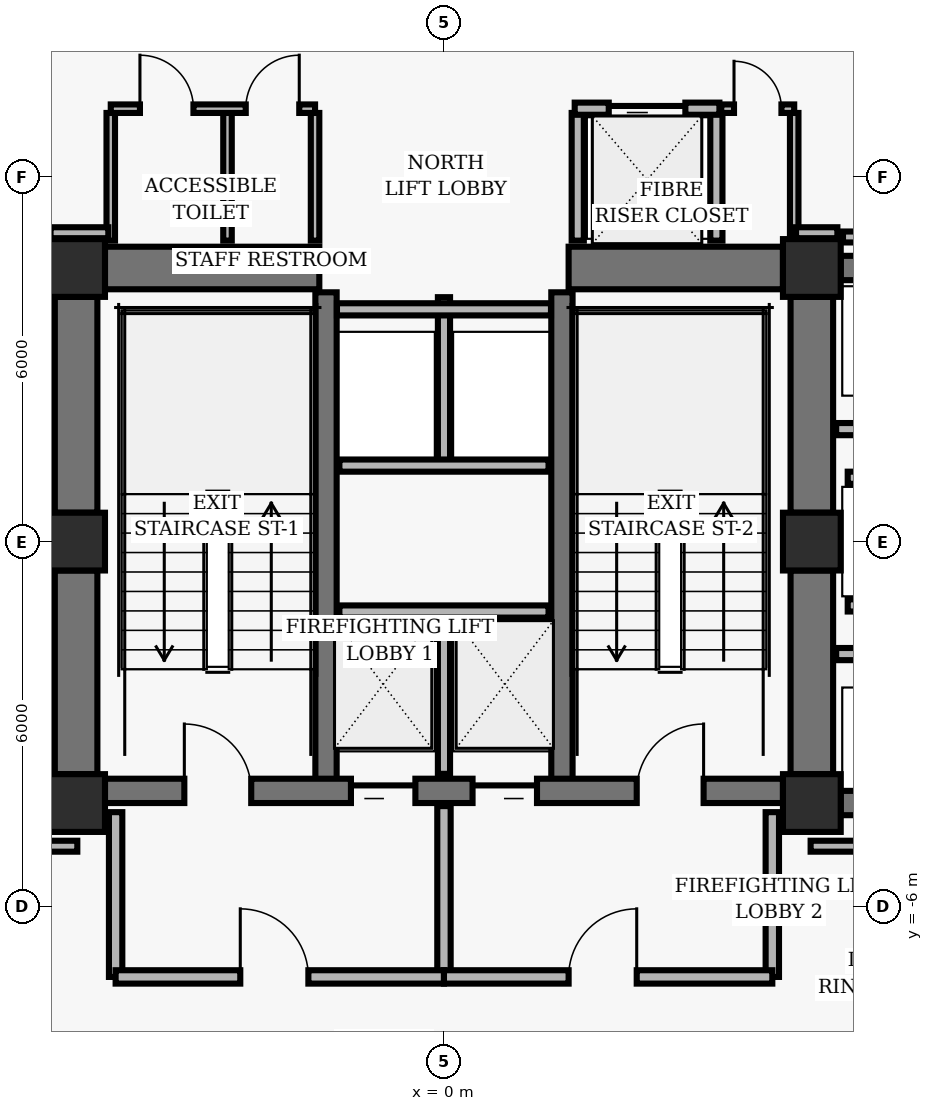
"""IFC4 building model, lengths in metres.
Left out: names, types, materials, properties, quantities, classifications, styles, units other than length and angle.
Written with IfcOpenShell. Run it as: python <this file> out.ifc"""

import sys

from ifc_helpers import new_model, si_unit, direction, frame, frame_2d, origin, origin_2d, place, context, subcontext, project, spatial, rectangle, hollow_rectangle, extrude, element, fill, save


model = new_model("IFC4")
c1 = context("Model", 3, precision=1e-05, world=origin(), true_north=direction((0.0, 1.0)))
c2 = subcontext(c1, "Body", "Model", "MODEL_VIEW")
j1 = project(units=[si_unit("LENGTHUNIT", "METRE"), si_unit("PLANEANGLEUNIT", "RADIAN")], contexts=[c1])
p1 = place(None, origin())
s1 = spatial("IfcSite", under=j1, at=p1, CompositionType="ELEMENT")
p2 = place(p1, origin())
s2 = spatial("IfcBuilding", under=s1, at=p2, CompositionType="ELEMENT")
p3 = place(p2, frame((0.0, 0.0, 39.04)))
s3 = spatial("IfcBuildingStorey", under=s2, at=p3, CompositionType="ELEMENT", Elevation=39.04)
for number, where, z_axis, x_axis in (
    (1, (-6.05, 4.5, 0.0), (0.0, 0.0, 1.0), (1.0, 0.0, 0.0)),
    (2, (6.05, 4.5, 0.0), (0.0, 0.0, 1.0), (1.0, 0.0, 0.0)),
    (3, (-6.05, 0.0, 0.0), (0.0, 0.0, 1.0), (1.0, 0.0, 0.0)),
    (4, (6.05, 0.0, 0.0), (0.0, 0.0, 1.0), (1.0, 0.0, 0.0)),
    (5, (-6.05, -4.3, 0.0), (0.0, 0.0, 1.0), (1.0, 0.0, 0.0)),
    (6, (6.05, -4.3, 0.0), (0.0, 0.0, 1.0), (1.0, 0.0, 0.0)),
):
    element("IfcColumn", number, at=place(p3, frame(where, z_axis=z_axis, x_axis=x_axis)), inside=s3, PredefinedType="COLUMN", context=c2, shape_type="SweptSolid", body=[
        extrude(hollow_rectangle(XDim=0.95, YDim=0.95, WallThickness=0.06, InnerFilletRadius=0.02, OuterFilletRadius=0.04, at=origin_2d()), origin(), (0.0, 0.0, 1.0), 3.36),
    ])
p4 = place(p3, frame((-6.05, 0.475, 0.0), z_axis=(0.0, 0.0, 1.0), x_axis=(0.0, 1.0, 0.0)))
e7 = element("IfcWall", 7, at=p4, inside=s3, PredefinedType="SHEAR", context=c2, shape_type="SweptSolid", body=[
    extrude(rectangle(XDim=3.55, YDim=0.7, at=frame_2d((1.775, 0.0))), origin(), (0.0, 0.0, 1.0), 3.098),
])
p5 = place(p3, frame((-6.05, -3.825, 0.0), z_axis=(0.0, 0.0, 1.0), x_axis=(0.0, 1.0, 0.0)))
e8 = element("IfcWall", 8, at=p5, inside=s3, PredefinedType="SHEAR", context=c2, shape_type="SweptSolid", body=[
    extrude(rectangle(XDim=3.35, YDim=0.7, at=frame_2d((1.675, 0.0))), origin(), (0.0, 0.0, 1.0), 3.098),
])
p6 = place(p3, frame((6.05, 0.475, 0.0), z_axis=(0.0, 0.0, 1.0), x_axis=(0.0, 1.0, 0.0)))
e9 = element("IfcWall", 9, at=p6, inside=s3, PredefinedType="SHEAR", context=c2, shape_type="SweptSolid", body=[
    extrude(rectangle(XDim=3.55, YDim=0.7, at=frame_2d((1.775, 0.0))), origin(), (0.0, 0.0, 1.0), 3.098),
])
p7 = place(p3, frame((6.05, -3.825, 0.0), z_axis=(0.0, 0.0, 1.0), x_axis=(0.0, 1.0, 0.0)))
e10 = element("IfcWall", 10, at=p7, inside=s3, PredefinedType="SHEAR", context=c2, shape_type="SweptSolid", body=[
    extrude(rectangle(XDim=3.35, YDim=0.7, at=frame_2d((1.675, 0.0))), origin(), (0.0, 0.0, 1.0), 3.098),
])
for number, where, z_axis, x_axis in (
    (11, (-1.94, -4.1, 0.0), (0.0, 0.0, 1.0), (0.0, 1.0, 0.0)),
    (12, (1.94, -4.1, 0.0), (0.0, 0.0, 1.0), (0.0, 1.0, 0.0)),
):
    element("IfcWall", number, at=place(p3, frame(where, z_axis=z_axis, x_axis=x_axis)), inside=s3, PredefinedType="SHEAR", context=c2, shape_type="SweptSolid", body=[
        extrude(rectangle(XDim=8.2, YDim=0.35, at=frame_2d((4.1, 0.0))), origin(), (0.0, 0.0, 1.0), 3.098),
    ])
p8 = place(p3, frame((-5.575, -4.1, 0.0), z_axis=(0.0, 0.0, 1.0), x_axis=(1.0, 0.0, 0.0)))
e13 = element("IfcWall", 13, at=p8, inside=s3, PredefinedType="SHEAR", context=c2, shape_type="SweptSolid", body=[
    extrude(rectangle(XDim=11.15, YDim=0.4, at=frame_2d((5.575, 0.0))), origin(), (0.0, 0.0, 1.0), 3.098),
])
p9 = place(p8, frame((1.305, 0.0, 0.0)))
e14 = element("IfcOpeningElement", 14, at=p9, cuts=e13, PredefinedType="OPENING", context=c2, shape_type="SweptSolid", body=[
    extrude(rectangle(XDim=1.1, YDim=2.04, at=frame_2d((0.55, 1.02))), frame((0.0, 0.21, 0.0), z_axis=(0.0, -1.0, 0.0), x_axis=(1.0, 0.0, 0.0)), (0.0, 0.0, 1.0), 0.42),
])
p10 = place(p8, frame((8.745, 0.0, 0.0)))
e15 = element("IfcOpeningElement", 15, at=p10, cuts=e13, PredefinedType="OPENING", context=c2, shape_type="SweptSolid", body=[
    extrude(rectangle(XDim=1.1, YDim=2.04, at=frame_2d((0.55, 1.02))), frame((0.0, 0.21, 0.0), z_axis=(0.0, -1.0, 0.0), x_axis=(1.0, 0.0, 0.0)), (0.0, 0.0, 1.0), 0.42),
])
p11 = place(p8, frame((4.045, 0.0, 0.0)))
e16 = element("IfcOpeningElement", 16, at=p11, cuts=e13, PredefinedType="OPENING", context=c2, shape_type="SweptSolid", body=[
    extrude(rectangle(XDim=1.06, YDim=2.04, at=frame_2d((0.53, 1.02))), frame((0.0, 0.21, 0.0), z_axis=(0.0, -1.0, 0.0), x_axis=(1.0, 0.0, 0.0)), (0.0, 0.0, 1.0), 0.42),
])
p12 = place(p8, frame((6.045, 0.0, 0.0)))
e17 = element("IfcOpeningElement", 17, at=p12, cuts=e13, PredefinedType="OPENING", context=c2, shape_type="SweptSolid", body=[
    extrude(rectangle(XDim=1.06, YDim=2.04, at=frame_2d((0.53, 1.02))), frame((0.0, 0.21, 0.0), z_axis=(0.0, -1.0, 0.0), x_axis=(1.0, 0.0, 0.0)), (0.0, 0.0, 1.0), 0.42),
])
for number, where, z_axis, x_axis in (
    (18, (-5.575, 4.5, 0.0), (0.0, 0.0, 1.0), (1.0, 0.0, 0.0)),
    (19, (2.05, 4.5, 0.0), (0.0, 0.0, 1.0), (1.0, 0.0, 0.0)),
):
    element("IfcWall", number, at=place(p3, frame(where, z_axis=z_axis, x_axis=x_axis)), inside=s3, PredefinedType="SHEAR", context=c2, shape_type="SweptSolid", body=[
        extrude(rectangle(XDim=3.525, YDim=0.7, at=frame_2d((1.762, 0.0))), origin(), (0.0, 0.0, 1.0), 3.098),
    ])
for number, where, z_axis, x_axis in (
    (20, (6.525, 4.5, 0.0), (0.0, 0.0, 1.0), (1.0, 0.0, 0.0)),
    (21, (6.525, -4.3, 0.0), (0.0, 0.0, 1.0), (1.0, 0.0, 0.0)),
):
    element("IfcWall", number, at=place(p3, frame(where, z_axis=z_axis, x_axis=x_axis)), inside=s3, PredefinedType="SHEAR", context=c2, shape_type="SweptSolid", body=[
        extrude(rectangle(XDim=1.95, YDim=0.4, at=frame_2d((0.975, 0.0))), origin(), (0.0, 0.0, 1.0), 3.098),
    ])
p13 = place(p3, frame((0.0, -3.82, 0.0), z_axis=(0.0, 0.0, 1.0), x_axis=(0.0, 1.0, 0.0)))
e22 = element("IfcWall", 22, at=p13, inside=s3, PredefinedType="PARTITIONING", context=c2, shape_type="SweptSolid", body=[
    extrude(rectangle(XDim=2.67, YDim=0.2, at=frame_2d((1.335, 0.0))), origin(), (0.0, 0.0, 1.0), 3.073),
])
p14 = place(p3, frame((-1.72, -1.15, 0.0), z_axis=(0.0, 0.0, 1.0), x_axis=(1.0, 0.0, 0.0)))
e23 = element("IfcWall", 23, at=p14, inside=s3, PredefinedType="PARTITIONING", context=c2, shape_type="SweptSolid", body=[
    extrude(rectangle(XDim=3.44, YDim=0.2, at=frame_2d((1.72, 0.0))), origin(), (0.0, 0.0, 1.0), 3.073),
])
for number, where, z_axis, x_axis in (
    (24, (-5.4, -7.16, 0.0), (0.0, 0.0, 1.0), (0.0, 1.0, 0.0)),
    (25, (5.4, -7.16, 0.0), (0.0, 0.0, 1.0), (0.0, 1.0, 0.0)),
):
    element("IfcWall", number, at=place(p3, frame(where, z_axis=z_axis, x_axis=x_axis)), inside=s3, PredefinedType="PARTITIONING", context=c2, shape_type="SweptSolid", body=[
        extrude(rectangle(XDim=2.71, YDim=0.22, at=frame_2d((1.355, 0.0))), origin(), (0.0, 0.0, 1.0), 3.073),
    ])
p15 = place(p3, frame((0.0, -7.16, 0.0), z_axis=(0.0, 0.0, 1.0), x_axis=(0.0, 1.0, 0.0)))
e26 = element("IfcWall", 26, at=p15, inside=s3, PredefinedType="PARTITIONING", context=c2, shape_type="SweptSolid", body=[
    extrude(rectangle(XDim=2.81, YDim=0.22, at=frame_2d((1.405, 0.0))), origin(), (0.0, 0.0, 1.0), 3.073),
])
p16 = place(p3, frame((-5.4, -7.16, 0.0), z_axis=(0.0, 0.0, 1.0), x_axis=(1.0, 0.0, 0.0)))
e27 = element("IfcWall", 27, at=p16, inside=s3, PredefinedType="PARTITIONING", context=c2, shape_type="SweptSolid", body=[
    extrude(rectangle(XDim=5.4, YDim=0.22, at=frame_2d((2.7, 0.0))), origin(), (0.0, 0.0, 1.0), 3.073),
])
p17 = place(p16, frame((2.05, 0.0, 0.0)))
e28 = element("IfcOpeningElement", 28, at=p17, cuts=e27, PredefinedType="OPENING", context=c2, shape_type="SweptSolid", body=[
    extrude(rectangle(XDim=1.12, YDim=2.02, at=frame_2d((0.56, 1.01))), frame((0.0, 0.12, 0.0), z_axis=(0.0, -1.0, 0.0), x_axis=(1.0, 0.0, 0.0)), (0.0, 0.0, 1.0), 0.24),
])
p18 = place(p3, frame((0.0, -7.16, 0.0), z_axis=(0.0, 0.0, 1.0), x_axis=(1.0, 0.0, 0.0)))
e29 = element("IfcWall", 29, at=p18, inside=s3, PredefinedType="PARTITIONING", context=c2, shape_type="SweptSolid", body=[
    extrude(rectangle(XDim=5.4, YDim=0.22, at=frame_2d((2.7, 0.0))), origin(), (0.0, 0.0, 1.0), 3.073),
])
p19 = place(p18, frame((2.05, 0.0, 0.0)))
e30 = element("IfcOpeningElement", 30, at=p19, cuts=e29, PredefinedType="OPENING", context=c2, shape_type="SweptSolid", body=[
    extrude(rectangle(XDim=1.12, YDim=2.02, at=frame_2d((0.56, 1.01))), frame((0.0, 0.12, 0.0), z_axis=(0.0, -1.0, 0.0), x_axis=(1.0, 0.0, 0.0)), (0.0, 0.0, 1.0), 0.24),
])
p20 = place(p3, frame((0.0, 1.25, 0.0), z_axis=(0.0, 0.0, 1.0), x_axis=(0.0, 1.0, 0.0)))
e31 = element("IfcWall", 31, at=p20, inside=s3, PredefinedType="PARTITIONING", context=c2, shape_type="SweptSolid", body=[
    extrude(rectangle(XDim=2.77, YDim=0.2, at=frame_2d((1.385, 0.0))), origin(), (0.0, 0.0, 1.0), 3.073),
])
p21 = place(p3, frame((-1.72, 1.25, 0.0), z_axis=(0.0, 0.0, 1.0), x_axis=(1.0, 0.0, 0.0)))
e32 = element("IfcWall", 32, at=p21, inside=s3, PredefinedType="PARTITIONING", context=c2, shape_type="SweptSolid", body=[
    extrude(rectangle(XDim=3.44, YDim=0.2, at=frame_2d((1.72, 0.0))), origin(), (0.0, 0.0, 1.0), 3.073),
])
p22 = place(p3, frame((-1.76, 3.82, 0.0), z_axis=(0.0, 0.0, 1.0), x_axis=(1.0, 0.0, 0.0)))
e33 = element("IfcWall", 33, at=p22, inside=s3, PredefinedType="PARTITIONING", context=c2, shape_type="SweptSolid", body=[
    extrude(rectangle(XDim=3.52, YDim=0.2, at=frame_2d((1.76, 0.0))), origin(), (0.0, 0.0, 1.0), 3.073),
])
for number, where, z_axis, x_axis in (
    (34, (2.2, 4.95, 0.0), (0.0, 0.0, 1.0), (0.0, 1.0, 0.0)),
    (35, (4.48, 4.95, 0.0), (0.0, 0.0, 1.0), (0.0, 1.0, 0.0)),
):
    element("IfcWall", number, at=place(p3, frame(where, z_axis=z_axis, x_axis=x_axis)), inside=s3, PredefinedType="PARTITIONING", context=c2, shape_type="SweptSolid", body=[
        extrude(rectangle(XDim=2.1, YDim=0.2, at=frame_2d((1.05, 0.0))), origin(), (0.0, 0.0, 1.0), 3.073),
    ])
p23 = place(p3, frame((2.15, 7.12, 0.0), z_axis=(0.0, 0.0, 1.0), x_axis=(1.0, 0.0, 0.0)))
e36 = element("IfcWall", 36, at=p23, inside=s3, PredefinedType="PARTITIONING", context=c2, shape_type="SweptSolid", body=[
    extrude(rectangle(XDim=2.38, YDim=0.2, at=frame_2d((1.19, 0.0))), origin(), (0.0, 0.0, 1.0), 3.073),
])
p24 = place(p23, frame((0.56, 0.0, 0.0)))
e37 = element("IfcOpeningElement", 37, at=p24, cuts=e36, PredefinedType="OPENING", context=c2, shape_type="SweptSolid", body=[
    extrude(rectangle(XDim=1.26, YDim=2.06, at=frame_2d((0.63, 1.03))), frame((0.0, 0.11, 0.0), z_axis=(0.0, -1.0, 0.0), x_axis=(1.0, 0.0, 0.0)), (0.0, 0.0, 1.0), 0.22),
])
for number, where, z_axis, x_axis in (
    (38, (-5.48, 4.95, 0.0), (0.0, 0.0, 1.0), (0.0, 1.0, 0.0)),
    (39, (-3.56, 4.95, 0.0), (0.0, 0.0, 1.0), (0.0, 1.0, 0.0)),
    (40, (-2.12, 4.95, 0.0), (0.0, 0.0, 1.0), (0.0, 1.0, 0.0)),
):
    element("IfcWall", number, at=place(p3, frame(where, z_axis=z_axis, x_axis=x_axis)), inside=s3, PredefinedType="PARTITIONING", context=c2, shape_type="SweptSolid", body=[
        extrude(rectangle(XDim=2.1, YDim=0.14, at=frame_2d((1.05, 0.0))), origin(), (0.0, 0.0, 1.0), 3.073),
    ])
p25 = place(p3, frame((-5.48, 7.12, 0.0), z_axis=(0.0, 0.0, 1.0), x_axis=(1.0, 0.0, 0.0)))
e41 = element("IfcWall", 41, at=p25, inside=s3, PredefinedType="PARTITIONING", context=c2, shape_type="SweptSolid", body=[
    extrude(rectangle(XDim=3.36, YDim=0.14, at=frame_2d((1.68, 0.0))), origin(), (0.0, 0.0, 1.0), 3.073),
])
p26 = place(p25, frame((0.48, 0.0, 0.0)))
e42 = element("IfcOpeningElement", 42, at=p26, cuts=e41, PredefinedType="OPENING", context=c2, shape_type="SweptSolid", body=[
    extrude(rectangle(XDim=0.88, YDim=2.02, at=frame_2d((0.44, 1.01))), frame((0.0, 0.08, 0.0), z_axis=(0.0, -1.0, 0.0), x_axis=(1.0, 0.0, 0.0)), (0.0, 0.0, 1.0), 0.16),
])
p27 = place(p25, frame((2.22, 0.0, 0.0)))
e43 = element("IfcOpeningElement", 43, at=p27, cuts=e41, PredefinedType="OPENING", context=c2, shape_type="SweptSolid", body=[
    extrude(rectangle(XDim=0.88, YDim=2.02, at=frame_2d((0.44, 1.01))), frame((0.0, 0.08, 0.0), z_axis=(0.0, -1.0, 0.0), x_axis=(1.0, 0.0, 0.0)), (0.0, 0.0, 1.0), 0.16),
])
p28 = place(p3, frame((5.76, 4.95, 0.0), z_axis=(0.0, 0.0, 1.0), x_axis=(0.0, 1.0, 0.0)))
e44 = element("IfcWall", 44, at=p28, inside=s3, PredefinedType="PARTITIONING", context=c2, shape_type="SweptSolid", body=[
    extrude(rectangle(XDim=2.1, YDim=0.14, at=frame_2d((1.05, 0.0))), origin(), (0.0, 0.0, 1.0), 3.073),
])
p29 = place(p3, frame((4.56, 7.12, 0.0), z_axis=(0.0, 0.0, 1.0), x_axis=(1.0, 0.0, 0.0)))
e45 = element("IfcWall", 45, at=p29, inside=s3, PredefinedType="PARTITIONING", context=c2, shape_type="SweptSolid", body=[
    extrude(rectangle(XDim=1.2, YDim=0.14, at=frame_2d((0.6, 0.0))), origin(), (0.0, 0.0, 1.0), 3.073),
])
p30 = place(p29, frame((0.21, 0.0, 0.0)))
e46 = element("IfcOpeningElement", 46, at=p30, cuts=e45, PredefinedType="OPENING", context=c2, shape_type="SweptSolid", body=[
    extrude(rectangle(XDim=0.78, YDim=2.01, at=frame_2d((0.39, 1.005))), frame((0.0, 0.08, 0.0), z_axis=(0.0, -1.0, 0.0), x_axis=(1.0, 0.0, 0.0)), (0.0, 0.0, 1.0), 0.16),
])
for number, where, z_axis, x_axis in (
    (47, (6.45, -1.85, 0.0), (0.0, 0.0, 1.0), (1.0, 0.0, 0.0)),
    (48, (6.45, 1.85, 0.0), (0.0, 0.0, 1.0), (1.0, 0.0, 0.0)),
):
    element("IfcWall", number, at=place(p3, frame(where, z_axis=z_axis, x_axis=x_axis)), inside=s3, PredefinedType="PARTITIONING", context=c2, shape_type="SweptSolid", body=[
        extrude(rectangle(XDim=2.1, YDim=0.2, at=frame_2d((1.05, 0.0))), origin(), (0.0, 0.0, 1.0), 3.073),
    ])
for number, where, z_axis, x_axis in (
    (49, (6.64, -1.05, 0.0), (0.0, 0.0, 1.0), (1.0, 0.0, 0.0)),
    (50, (6.64, 1.05, 0.0), (0.0, 0.0, 1.0), (1.0, 0.0, 0.0)),
):
    element("IfcWall", number, at=place(p3, frame(where, z_axis=z_axis, x_axis=x_axis)), inside=s3, PredefinedType="PARTITIONING", context=c2, shape_type="SweptSolid", body=[
        extrude(rectangle(XDim=1.91, YDim=0.2, at=frame_2d((0.955, 0.0))), origin(), (0.0, 0.0, 1.0), 3.073),
    ])
for number, where, z_axis, x_axis in (
    (51, (-9.37, -5.01, 0.0), (0.0, 0.0, 1.0), (1.0, 0.0, 0.0)),
    (52, (6.03, -5.01, 0.0), (0.0, 0.0, 1.0), (1.0, 0.0, 0.0)),
):
    element("IfcWall", number, at=place(p3, frame(where, z_axis=z_axis, x_axis=x_axis)), inside=s3, PredefinedType="PARTITIONING", context=c2, shape_type="SweptSolid", body=[
        extrude(rectangle(XDim=3.34, YDim=0.18, at=frame_2d((1.67, 0.0))), origin(), (0.0, 0.0, 1.0), 3.073),
    ])
p31 = place(p3, frame((9.37, 5.01, 0.0), z_axis=(0.0, 0.0, 1.0), x_axis=(-1.0, 0.0, 0.0)))
e53 = element("IfcWall", 53, at=p31, inside=s3, PredefinedType="PARTITIONING", context=c2, shape_type="SweptSolid", body=[
    extrude(rectangle(XDim=2.808, YDim=0.18, at=frame_2d((1.404, 0.0))), origin(), (0.0, 0.0, 1.0), 3.073),
])
p32 = place(p3, frame((6.47, 5.08, 0.0), z_axis=(0.0, 0.0, 1.0), x_axis=(-1.0, 0.0, 0.0)))
e54 = element("IfcWall", 54, at=p32, inside=s3, PredefinedType="PARTITIONING", context=c2, shape_type="SweptSolid", body=[
    extrude(rectangle(XDim=0.68, YDim=0.18, at=frame_2d((0.34, 0.0))), origin(), (0.0, 0.0, 1.0), 3.073),
])
p33 = place(p3, frame((-5.52, 5.08, 0.0), z_axis=(0.0, 0.0, 1.0), x_axis=(-1.0, 0.0, 0.0)))
e55 = element("IfcWall", 55, at=p33, inside=s3, PredefinedType="PARTITIONING", context=c2, shape_type="SweptSolid", body=[
    extrude(rectangle(XDim=0.95, YDim=0.18, at=frame_2d((0.475, 0.0))), origin(), (0.0, 0.0, 1.0), 3.073),
])
p34 = place(p9, origin())
e56 = element("IfcDoor", 56, at=p34, inside=s3, OperationType="SINGLE_SWING_LEFT", PredefinedType="DOOR", context=c2, shape_type="SweptSolid", body=[
    extrude(rectangle(XDim=1.1, YDim=2.04, at=frame_2d((0.55, 1.02))), frame((0.0, 0.025, 0.0), z_axis=(0.0, -1.0, 0.0), x_axis=(1.0, 0.0, 0.0)), (0.0, 0.0, 1.0), 0.05),
])
fill(e14, e56)
p35 = place(p10, origin())
e57 = element("IfcDoor", 57, at=p35, inside=s3, OperationType="SINGLE_SWING_RIGHT", PredefinedType="DOOR", context=c2, shape_type="SweptSolid", body=[
    extrude(rectangle(XDim=1.1, YDim=2.04, at=frame_2d((0.55, 1.02))), frame((0.0, 0.025, 0.0), z_axis=(0.0, -1.0, 0.0), x_axis=(1.0, 0.0, 0.0)), (0.0, 0.0, 1.0), 0.05),
])
fill(e15, e57)
p36 = place(p11, origin())
e58 = element("IfcDoor", 58, at=p36, inside=s3, OperationType="SLIDING_TO_LEFT", PredefinedType="DOOR", context=c2, shape_type="SweptSolid", body=[
    extrude(rectangle(XDim=1.06, YDim=2.04, at=frame_2d((0.53, 1.02))), frame((0.0, 0.025, 0.0), z_axis=(0.0, -1.0, 0.0), x_axis=(1.0, 0.0, 0.0)), (0.0, 0.0, 1.0), 0.05),
])
fill(e16, e58)
p37 = place(p12, origin())
e59 = element("IfcDoor", 59, at=p37, inside=s3, OperationType="SLIDING_TO_RIGHT", PredefinedType="DOOR", context=c2, shape_type="SweptSolid", body=[
    extrude(rectangle(XDim=1.06, YDim=2.04, at=frame_2d((0.53, 1.02))), frame((0.0, 0.025, 0.0), z_axis=(0.0, -1.0, 0.0), x_axis=(1.0, 0.0, 0.0)), (0.0, 0.0, 1.0), 0.05),
])
fill(e17, e59)
p38 = place(p17, origin())
e60 = element("IfcDoor", 60, at=p38, inside=s3, OperationType="SINGLE_SWING_LEFT", PredefinedType="DOOR", context=c2, shape_type="SweptSolid", body=[
    extrude(rectangle(XDim=1.12, YDim=2.02, at=frame_2d((0.56, 1.01))), frame((0.0, 0.025, 0.0), z_axis=(0.0, -1.0, 0.0), x_axis=(1.0, 0.0, 0.0)), (0.0, 0.0, 1.0), 0.05),
])
fill(e28, e60)
p39 = place(p19, origin())
e61 = element("IfcDoor", 61, at=p39, inside=s3, OperationType="SINGLE_SWING_RIGHT", PredefinedType="DOOR", context=c2, shape_type="SweptSolid", body=[
    extrude(rectangle(XDim=1.12, YDim=2.02, at=frame_2d((0.56, 1.01))), frame((0.0, 0.025, 0.0), z_axis=(0.0, -1.0, 0.0), x_axis=(1.0, 0.0, 0.0)), (0.0, 0.0, 1.0), 0.05),
])
fill(e30, e61)
p40 = place(p24, origin())
e62 = element("IfcDoor", 62, at=p40, inside=s3, OperationType="SLIDING_TO_LEFT", PredefinedType="DOOR", context=c2, shape_type="SweptSolid", body=[
    extrude(rectangle(XDim=1.26, YDim=2.06, at=frame_2d((0.63, 1.03))), frame((0.0, 0.025, 0.0), z_axis=(0.0, -1.0, 0.0), x_axis=(1.0, 0.0, 0.0)), (0.0, 0.0, 1.0), 0.05),
])
fill(e37, e62)
p41 = place(p26, origin())
e63 = element("IfcDoor", 63, at=p41, inside=s3, OperationType="SINGLE_SWING_LEFT", PredefinedType="DOOR", context=c2, shape_type="SweptSolid", body=[
    extrude(rectangle(XDim=0.88, YDim=2.02, at=frame_2d((0.44, 1.01))), frame((0.0, 0.025, 0.0), z_axis=(0.0, -1.0, 0.0), x_axis=(1.0, 0.0, 0.0)), (0.0, 0.0, 1.0), 0.05),
])
fill(e42, e63)
p42 = place(p27, origin())
e64 = element("IfcDoor", 64, at=p42, inside=s3, OperationType="SINGLE_SWING_RIGHT", PredefinedType="DOOR", context=c2, shape_type="SweptSolid", body=[
    extrude(rectangle(XDim=0.88, YDim=2.02, at=frame_2d((0.44, 1.01))), frame((0.0, 0.025, 0.0), z_axis=(0.0, -1.0, 0.0), x_axis=(1.0, 0.0, 0.0)), (0.0, 0.0, 1.0), 0.05),
])
fill(e43, e64)
p43 = place(p30, origin())
e65 = element("IfcDoor", 65, at=p43, inside=s3, OperationType="SINGLE_SWING_LEFT", PredefinedType="DOOR", context=c2, shape_type="SweptSolid", body=[
    extrude(rectangle(XDim=0.78, YDim=2.01, at=frame_2d((0.39, 1.005))), frame((0.0, 0.025, 0.0), z_axis=(0.0, -1.0, 0.0), x_axis=(1.0, 0.0, 0.0)), (0.0, 0.0, 1.0), 0.05),
])
fill(e46, e65)
save(model, sys.argv[1])
